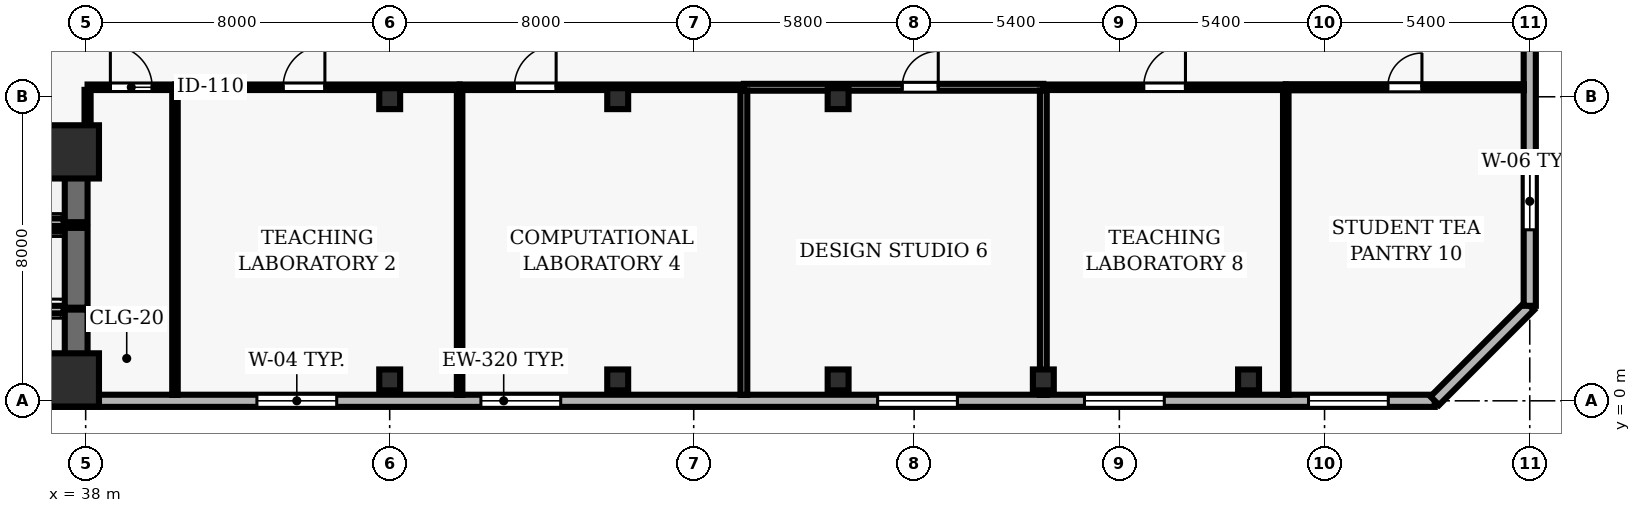
"""IFC4 building model, lengths in metres.
Left out: names, types, materials, properties, quantities, classifications, styles, units other than length and angle.
Written with IfcOpenShell. Run it as: python <this file> out.ifc"""

import sys

from ifc_helpers import new_model, si_unit, direction, frame, frame_2d, origin, origin_2d, place, context, subcontext, project, spatial, rectangle, hollow_rectangle, extrude, element, fill, save


model = new_model("IFC4")
c1 = context("Model", 3, precision=1e-05, world=origin(), true_north=direction((0.0, 1.0)))
c2 = subcontext(c1, "Body", "Model", "MODEL_VIEW")
j1 = project(units=[si_unit("LENGTHUNIT", "METRE"), si_unit("PLANEANGLEUNIT", "RADIAN")], contexts=[c1])
p1 = place(None, origin())
s1 = spatial("IfcSite", under=j1, at=p1, CompositionType="ELEMENT")
p2 = place(p1, origin())
s2 = spatial("IfcBuilding", under=s1, at=p2, CompositionType="ELEMENT")
p3 = place(p2, frame((0.0, 0.0, 66.1)))
s3 = spatial("IfcBuildingStorey", under=s2, at=p3, CompositionType="ELEMENT", Elevation=66.1)
for number, where, z_axis, x_axis in (
    (1, (37.65, 0.55, 0.0), (0.0, 0.0, 1.0), (1.0, 0.0, 0.0)),
    (2, (37.65, 6.55, 0.0), (0.0, 0.0, 1.0), (1.0, 0.0, 0.0)),
):
    element("IfcColumn", number, at=place(p3, frame(where, z_axis=z_axis, x_axis=x_axis)), inside=s3, PredefinedType="COLUMN", context=c2, shape_type="SweptSolid", body=[
        extrude(rectangle(XDim=1.4, YDim=1.4, at=origin_2d()), origin(), (0.0, 0.0, 1.0), 3.9),
    ])
for number, where, z_axis, x_axis in (
    (3, (46.0, 0.55, 0.0), (0.0, 0.0, 1.0), (1.0, 0.0, 0.0)),
    (4, (46.0, 7.95, 0.0), (0.0, 0.0, 1.0), (1.0, 0.0, 0.0)),
    (5, (52.0, 0.55, 0.0), (0.0, 0.0, 1.0), (1.0, 0.0, 0.0)),
    (6, (52.0, 7.95, 0.0), (0.0, 0.0, 1.0), (1.0, 0.0, 0.0)),
    (7, (57.8, 0.55, 0.0), (0.0, 0.0, 1.0), (1.0, 0.0, 0.0)),
    (8, (57.8, 7.95, 0.0), (0.0, 0.0, 1.0), (1.0, 0.0, 0.0)),
    (9, (63.2, 0.55, 0.0), (0.0, 0.0, 1.0), (1.0, 0.0, 0.0)),
    (10, (68.6, 0.55, 0.0), (0.0, 0.0, 1.0), (1.0, 0.0, 0.0)),
):
    element("IfcColumn", number, at=place(p3, frame(where, z_axis=z_axis, x_axis=x_axis)), inside=s3, PredefinedType="COLUMN", context=c2, shape_type="SweptSolid", body=[
        extrude(hollow_rectangle(XDim=0.55, YDim=0.55, WallThickness=0.025, at=origin_2d()), origin(), (0.0, 0.0, 1.0), 3.9),
    ])
p4 = place(p3, frame((24.5, 0.0, 0.0), z_axis=(0.0, 0.0, 1.0), x_axis=(1.0, 0.0, 0.0)))
e11 = element("IfcWall", 11, at=p4, inside=s3, PredefinedType="SOLIDWALL", context=c2, shape_type="SweptSolid", body=[
    extrude(rectangle(XDim=49.0, YDim=0.32, at=frame_2d((24.5, 0.0))), origin(), (0.0, 0.0, 1.0), 3.69),
])
p5 = place(p4, frame((1.672, 0.0, 0.9)))
e12 = element("IfcOpeningElement", 12, at=p5, cuts=e11, PredefinedType="OPENING", context=c2, shape_type="SweptSolid", body=[
    extrude(rectangle(XDim=2.1, YDim=1.6, at=frame_2d((1.05, 0.8))), frame((0.0, 0.17, 0.0), z_axis=(0.0, -1.0, 0.0), x_axis=(1.0, 0.0, 0.0)), (0.0, 0.0, 1.0), 0.34),
])
p6 = place(p4, frame((18.006, 0.0, 0.9)))
e13 = element("IfcOpeningElement", 13, at=p6, cuts=e11, PredefinedType="OPENING", context=c2, shape_type="SweptSolid", body=[
    extrude(rectangle(XDim=2.1, YDim=1.6, at=frame_2d((1.05, 0.8))), frame((0.0, 0.17, 0.0), z_axis=(0.0, -1.0, 0.0), x_axis=(1.0, 0.0, 0.0)), (0.0, 0.0, 1.0), 0.34),
])
p7 = place(p4, frame((23.9, 0.0, 0.9)))
e14 = element("IfcOpeningElement", 14, at=p7, cuts=e11, PredefinedType="OPENING", context=c2, shape_type="SweptSolid", body=[
    extrude(rectangle(XDim=2.1, YDim=1.6, at=frame_2d((1.05, 0.8))), frame((0.0, 0.17, 0.0), z_axis=(0.0, -1.0, 0.0), x_axis=(1.0, 0.0, 0.0)), (0.0, 0.0, 1.0), 0.34),
])
p8 = place(p4, frame((34.339, 0.0, 0.9)))
e15 = element("IfcOpeningElement", 15, at=p8, cuts=e11, PredefinedType="OPENING", context=c2, shape_type="SweptSolid", body=[
    extrude(rectangle(XDim=2.1, YDim=1.6, at=frame_2d((1.05, 0.8))), frame((0.0, 0.17, 0.0), z_axis=(0.0, -1.0, 0.0), x_axis=(1.0, 0.0, 0.0)), (0.0, 0.0, 1.0), 0.34),
])
p9 = place(p4, frame((39.783, 0.0, 0.9)))
e16 = element("IfcOpeningElement", 16, at=p9, cuts=e11, PredefinedType="OPENING", context=c2, shape_type="SweptSolid", body=[
    extrude(rectangle(XDim=2.1, YDim=1.6, at=frame_2d((1.05, 0.8))), frame((0.0, 0.17, 0.0), z_axis=(0.0, -1.0, 0.0), x_axis=(1.0, 0.0, 0.0)), (0.0, 0.0, 1.0), 0.34),
])
p10 = place(p4, frame((45.678, 0.0, 0.9)))
e17 = element("IfcOpeningElement", 17, at=p10, cuts=e11, PredefinedType="OPENING", context=c2, shape_type="SweptSolid", body=[
    extrude(rectangle(XDim=2.1, YDim=1.6, at=frame_2d((1.05, 0.8))), frame((0.0, 0.17, 0.0), z_axis=(0.0, -1.0, 0.0), x_axis=(1.0, 0.0, 0.0)), (0.0, 0.0, 1.0), 0.34),
])
p11 = place(p3, frame((73.5, 0.0, 0.0), z_axis=(0.0, 0.0, 1.0), x_axis=(0.707106781187, 0.707106781187, 0.0)))
e18 = element("IfcWall", 18, at=p11, inside=s3, PredefinedType="SOLIDWALL", context=c2, shape_type="SweptSolid", body=[
    extrude(rectangle(XDim=3.536, YDim=0.32, at=frame_2d((1.768, 0.0))), origin(), (0.0, 0.0, 1.0), 3.69),
])
p12 = place(p3, frame((76.0, 2.5, 0.0), z_axis=(0.0, 0.0, 1.0), x_axis=(0.0, 1.0, 0.0)))
e19 = element("IfcWall", 19, at=p12, inside=s3, PredefinedType="SOLIDWALL", context=c2, shape_type="SweptSolid", body=[
    extrude(rectangle(XDim=11.0, YDim=0.32, at=frame_2d((5.5, 0.0))), origin(), (0.0, 0.0, 1.0), 3.69),
])
p13 = place(p12, frame((2.0, 0.0, 0.9)))
e20 = element("IfcOpeningElement", 20, at=p13, cuts=e19, PredefinedType="OPENING", context=c2, shape_type="SweptSolid", body=[
    extrude(rectangle(XDim=1.5, YDim=1.8, at=frame_2d((0.75, 0.9))), frame((0.0, 0.17, 0.0), z_axis=(0.0, -1.0, 0.0), x_axis=(1.0, 0.0, 0.0)), (0.0, 0.0, 1.0), 0.34),
])
p14 = place(p12, frame((8.4, 0.0, 0.9)))
e21 = element("IfcOpeningElement", 21, at=p14, cuts=e19, PredefinedType="OPENING", context=c2, shape_type="SweptSolid", body=[
    extrude(rectangle(XDim=1.5, YDim=1.8, at=frame_2d((0.75, 0.9))), frame((0.0, 0.17, 0.0), z_axis=(0.0, -1.0, 0.0), x_axis=(1.0, 0.0, 0.0)), (0.0, 0.0, 1.0), 0.34),
])
p15 = place(p3, frame((37.75, 0.3, 0.0), z_axis=(0.0, 0.0, 1.0), x_axis=(0.0, 1.0, 0.0)))
e22 = element("IfcWall", 22, at=p15, inside=s3, PredefinedType="SHEAR", context=c2, shape_type="SweptSolid", body=[
    extrude(rectangle(XDim=2.1, YDim=0.6, at=frame_2d((1.05, 0.0))), origin(), (0.0, 0.0, 1.0), 3.69),
])
for number, where, z_axis, x_axis in (
    (23, (35.28, 0.3, 0.0), (0.0, 0.0, 1.0), (1.0, 0.0, 0.0)),
    (24, (37.42, 2.4, 0.0), (0.0, 0.0, 1.0), (-1.0, 0.0, 0.0)),
):
    element("IfcWall", number, at=place(p3, frame(where, z_axis=z_axis, x_axis=x_axis)), inside=s3, PredefinedType="SOLIDWALL", context=c2, shape_type="SweptSolid", body=[
        extrude(rectangle(XDim=2.14, YDim=0.2, at=frame_2d((1.07, 0.0))), origin(), (0.0, 0.0, 1.0), 3.69),
    ])
p16 = place(p3, frame((37.75, 2.45, 0.0), z_axis=(0.0, 0.0, 1.0), x_axis=(0.0, 1.0, 0.0)))
e25 = element("IfcWall", 25, at=p16, inside=s3, PredefinedType="SHEAR", context=c2, shape_type="SweptSolid", body=[
    extrude(rectangle(XDim=2.1, YDim=0.6, at=frame_2d((1.05, 0.0))), origin(), (0.0, 0.0, 1.0), 3.69),
])
p17 = place(p3, frame((37.42, 4.55, 0.0), z_axis=(0.0, 0.0, 1.0), x_axis=(-1.0, 0.0, 0.0)))
e26 = element("IfcWall", 26, at=p17, inside=s3, PredefinedType="SOLIDWALL", context=c2, shape_type="SweptSolid", body=[
    extrude(rectangle(XDim=2.14, YDim=0.2, at=frame_2d((1.07, 0.0))), origin(), (0.0, 0.0, 1.0), 3.69),
])
p18 = place(p3, frame((37.75, 4.7, 0.0), z_axis=(0.0, 0.0, 1.0), x_axis=(0.0, 1.0, 0.0)))
e27 = element("IfcWall", 27, at=p18, inside=s3, PredefinedType="SHEAR", context=c2, shape_type="SweptSolid", body=[
    extrude(rectangle(XDim=2.25, YDim=0.6, at=frame_2d((1.125, 0.0))), origin(), (0.0, 0.0, 1.0), 3.69),
])
for number, where, z_axis, x_axis in (
    (28, (35.28, 4.7, 0.0), (0.0, 0.0, 1.0), (1.0, 0.0, 0.0)),
    (29, (37.42, 6.95, 0.0), (0.0, 0.0, 1.0), (-1.0, 0.0, 0.0)),
):
    element("IfcWall", number, at=place(p3, frame(where, z_axis=z_axis, x_axis=x_axis)), inside=s3, PredefinedType="SOLIDWALL", context=c2, shape_type="SweptSolid", body=[
        extrude(rectangle(XDim=2.14, YDim=0.2, at=frame_2d((1.07, 0.0))), origin(), (0.0, 0.0, 1.0), 3.69),
    ])
p19 = place(p3, frame((38.05, 8.25, 0.0), z_axis=(0.0, 0.0, 1.0), x_axis=(1.0, 0.0, 0.0)))
e30 = element("IfcWall", 30, at=p19, inside=s3, PredefinedType="PARTITIONING", context=c2, shape_type="SweptSolid", body=[
    extrude(rectangle(XDim=2.3, YDim=0.145, at=frame_2d((1.15, 0.0))), origin(), (0.0, 0.0, 1.0), 3.055),
])
p20 = place(p19, frame((0.6, 0.0, 0.0)))
e31 = element("IfcOpeningElement", 31, at=p20, cuts=e30, PredefinedType="OPENING", context=c2, shape_type="SweptSolid", body=[
    extrude(rectangle(XDim=1.1, YDim=2.15, at=frame_2d((0.55, 1.075))), frame((0.0, 0.083, 0.0), z_axis=(0.0, -1.0, 0.0), x_axis=(1.0, 0.0, 0.0)), (0.0, 0.0, 1.0), 0.165),
])
p21 = place(p3, frame((40.35, 8.25, 0.0), z_axis=(0.0, 0.0, 1.0), x_axis=(1.0, 0.0, 0.0)))
e32 = element("IfcWall", 32, at=p21, inside=s3, PredefinedType="PARTITIONING", context=c2, shape_type="SweptSolid", body=[
    extrude(rectangle(XDim=7.49, YDim=0.145, at=frame_2d((3.745, 0.0))), origin(), (0.0, 0.0, 1.0), 3.055),
])
p22 = place(p21, frame((2.845, 0.0, 0.0)))
e33 = element("IfcOpeningElement", 33, at=p22, cuts=e32, PredefinedType="OPENING", context=c2, shape_type="SweptSolid", body=[
    extrude(rectangle(XDim=1.1, YDim=2.15, at=frame_2d((0.55, 1.075))), frame((0.0, 0.083, 0.0), z_axis=(0.0, -1.0, 0.0), x_axis=(1.0, 0.0, 0.0)), (0.0, 0.0, 1.0), 0.165),
])
p23 = place(p3, frame((47.84, 8.25, 0.0), z_axis=(0.0, 0.0, 1.0), x_axis=(1.0, 0.0, 0.0)))
e34 = element("IfcWall", 34, at=p23, inside=s3, PredefinedType="PARTITIONING", context=c2, shape_type="SweptSolid", body=[
    extrude(rectangle(XDim=7.48, YDim=0.145, at=frame_2d((3.74, 0.0))), origin(), (0.0, 0.0, 1.0), 3.055),
])
p24 = place(p23, frame((1.44, 0.0, 0.0)))
e35 = element("IfcOpeningElement", 35, at=p24, cuts=e34, PredefinedType="OPENING", context=c2, shape_type="SweptSolid", body=[
    extrude(rectangle(XDim=1.1, YDim=2.15, at=frame_2d((0.55, 1.075))), frame((0.0, 0.083, 0.0), z_axis=(0.0, -1.0, 0.0), x_axis=(1.0, 0.0, 0.0)), (0.0, 0.0, 1.0), 0.165),
])
p25 = place(p3, frame((55.32, 8.25, 0.0), z_axis=(0.0, 0.0, 1.0), x_axis=(1.0, 0.0, 0.0)))
e36 = element("IfcWall", 36, at=p25, inside=s3, PredefinedType="PARTITIONING", context=c2, shape_type="SweptSolid", body=[
    extrude(rectangle(XDim=7.88, YDim=0.18, at=frame_2d((3.94, 0.0))), origin(), (0.0, 0.0, 1.0), 3.055),
])
p26 = place(p25, frame((4.165, 0.0, 0.0)))
e37 = element("IfcOpeningElement", 37, at=p26, cuts=e36, PredefinedType="OPENING", context=c2, shape_type="SweptSolid", body=[
    extrude(rectangle(XDim=0.95, YDim=2.1, at=frame_2d((0.475, 1.05))), frame((0.0, 0.1, 0.0), z_axis=(0.0, -1.0, 0.0), x_axis=(1.0, 0.0, 0.0)), (0.0, 0.0, 1.0), 0.2),
])
p27 = place(p3, frame((63.2, 8.25, 0.0), z_axis=(0.0, 0.0, 1.0), x_axis=(1.0, 0.0, 0.0)))
e38 = element("IfcWall", 38, at=p27, inside=s3, PredefinedType="PARTITIONING", context=c2, shape_type="SweptSolid", body=[
    extrude(rectangle(XDim=6.38, YDim=0.145, at=frame_2d((3.19, 0.0))), origin(), (0.0, 0.0, 1.0), 3.69),
])
p28 = place(p27, frame((2.64, 0.0, 0.0)))
e39 = element("IfcOpeningElement", 39, at=p28, cuts=e38, PredefinedType="OPENING", context=c2, shape_type="SweptSolid", body=[
    extrude(rectangle(XDim=1.1, YDim=2.15, at=frame_2d((0.55, 1.075))), frame((0.0, 0.083, 0.0), z_axis=(0.0, -1.0, 0.0), x_axis=(1.0, 0.0, 0.0)), (0.0, 0.0, 1.0), 0.165),
])
p29 = place(p3, frame((69.58, 8.25, 0.0), z_axis=(0.0, 0.0, 1.0), x_axis=(1.0, 0.0, 0.0)))
e40 = element("IfcWall", 40, at=p29, inside=s3, PredefinedType="PARTITIONING", context=c2, shape_type="SweptSolid", body=[
    extrude(rectangle(XDim=6.265, YDim=0.16, at=frame_2d((3.132, 0.0))), origin(), (0.0, 0.0, 1.0), 3.69),
])
p30 = place(p29, frame((2.683, 0.0, 0.0)))
e41 = element("IfcOpeningElement", 41, at=p30, cuts=e40, PredefinedType="OPENING", context=c2, shape_type="SweptSolid", body=[
    extrude(rectangle(XDim=0.9, YDim=2.1, at=frame_2d((0.45, 1.05))), frame((0.0, 0.09, 0.0), z_axis=(0.0, -1.0, 0.0), x_axis=(1.0, 0.0, 0.0)), (0.0, 0.0, 1.0), 0.18),
])
p31 = place(p3, frame((38.05, 7.05, 0.0), z_axis=(0.0, 0.0, 1.0), x_axis=(0.0, 1.0, 0.0)))
e42 = element("IfcWall", 42, at=p31, inside=s3, PredefinedType="PARTITIONING", context=c2, shape_type="SweptSolid", body=[
    extrude(rectangle(XDim=1.132, YDim=0.16, at=frame_2d((0.566, 0.0))), origin(), (0.0, 0.0, 1.0), 3.055),
])
for number, where, z_axis, x_axis in (
    (43, (40.35, 0.155, 0.0), (0.0, 0.0, 1.0), (0.0, 1.0, 0.0)),
    (44, (47.84, 0.155, 0.0), (0.0, 0.0, 1.0), (0.0, 1.0, 0.0)),
):
    element("IfcWall", number, at=place(p3, frame(where, z_axis=z_axis, x_axis=x_axis)), inside=s3, PredefinedType="PARTITIONING", context=c2, shape_type="SweptSolid", body=[
        extrude(rectangle(XDim=8.027, YDim=0.145, at=frame_2d((4.013, 0.0))), origin(), (0.0, 0.0, 1.0), 3.69),
    ])
p32 = place(p3, frame((55.32, 0.155, 0.0), z_axis=(0.0, 0.0, 1.0), x_axis=(0.0, 1.0, 0.0)))
e45 = element("IfcWall", 45, at=p32, inside=s3, PredefinedType="PARTITIONING", context=c2, shape_type="SweptSolid", body=[
    extrude(rectangle(XDim=8.01, YDim=0.18, at=frame_2d((4.005, 0.0))), origin(), (0.0, 0.0, 1.0), 3.69),
])
p33 = place(p3, frame((63.2, 0.155, 0.0), z_axis=(0.0, 0.0, 1.0), x_axis=(0.0, 1.0, 0.0)))
e46 = element("IfcWall", 46, at=p33, inside=s3, PredefinedType="PARTITIONING", context=c2, shape_type="SweptSolid", body=[
    extrude(rectangle(XDim=8.01, YDim=0.18, at=frame_2d((4.005, 0.0))), origin(), (0.0, 0.0, 1.0), 3.055),
])
p34 = place(p3, frame((69.58, 0.155, 0.0), z_axis=(0.0, 0.0, 1.0), x_axis=(0.0, 1.0, 0.0)))
e47 = element("IfcWall", 47, at=p34, inside=s3, PredefinedType="PARTITIONING", context=c2, shape_type="SweptSolid", body=[
    extrude(rectangle(XDim=8.02, YDim=0.145, at=frame_2d((4.01, 0.0))), origin(), (0.0, 0.0, 1.0), 3.69),
])
p35 = place(p6, origin())
e48 = element("IfcWindow", 48, at=p35, inside=s3, PartitioningType="SINGLE_PANEL", PredefinedType="WINDOW", context=c2, shape_type="SweptSolid", body=[
    extrude(rectangle(XDim=2.1, YDim=1.6, at=frame_2d((1.05, 0.8))), frame((0.0, 0.03, 0.0), z_axis=(0.0, -1.0, 0.0), x_axis=(1.0, 0.0, 0.0)), (0.0, 0.0, 1.0), 0.06),
])
fill(e13, e48)
p36 = place(p7, origin())
e49 = element("IfcWindow", 49, at=p36, inside=s3, PartitioningType="SINGLE_PANEL", PredefinedType="WINDOW", context=c2, shape_type="SweptSolid", body=[
    extrude(rectangle(XDim=2.1, YDim=1.6, at=frame_2d((1.05, 0.8))), frame((0.0, 0.03, 0.0), z_axis=(0.0, -1.0, 0.0), x_axis=(1.0, 0.0, 0.0)), (0.0, 0.0, 1.0), 0.06),
])
fill(e14, e49)
p37 = place(p8, origin())
e50 = element("IfcWindow", 50, at=p37, inside=s3, PartitioningType="SINGLE_PANEL", PredefinedType="WINDOW", context=c2, shape_type="SweptSolid", body=[
    extrude(rectangle(XDim=2.1, YDim=1.6, at=frame_2d((1.05, 0.8))), frame((0.0, 0.03, 0.0), z_axis=(0.0, -1.0, 0.0), x_axis=(1.0, 0.0, 0.0)), (0.0, 0.0, 1.0), 0.06),
])
fill(e15, e50)
p38 = place(p9, origin())
e51 = element("IfcWindow", 51, at=p38, inside=s3, PartitioningType="SINGLE_PANEL", PredefinedType="WINDOW", context=c2, shape_type="SweptSolid", body=[
    extrude(rectangle(XDim=2.1, YDim=1.6, at=frame_2d((1.05, 0.8))), frame((0.0, 0.03, 0.0), z_axis=(0.0, -1.0, 0.0), x_axis=(1.0, 0.0, 0.0)), (0.0, 0.0, 1.0), 0.06),
])
fill(e16, e51)
p39 = place(p10, origin())
e52 = element("IfcWindow", 52, at=p39, inside=s3, PartitioningType="SINGLE_PANEL", PredefinedType="WINDOW", context=c2, shape_type="SweptSolid", body=[
    extrude(rectangle(XDim=2.1, YDim=1.6, at=frame_2d((1.05, 0.8))), frame((0.0, 0.03, 0.0), z_axis=(0.0, -1.0, 0.0), x_axis=(1.0, 0.0, 0.0)), (0.0, 0.0, 1.0), 0.06),
])
fill(e17, e52)
p40 = place(p13, origin())
e53 = element("IfcWindow", 53, at=p40, inside=s3, PartitioningType="SINGLE_PANEL", PredefinedType="WINDOW", context=c2, shape_type="SweptSolid", body=[
    extrude(rectangle(XDim=1.5, YDim=1.8, at=frame_2d((0.75, 0.9))), frame((0.0, 0.03, 0.0), z_axis=(0.0, -1.0, 0.0), x_axis=(1.0, 0.0, 0.0)), (0.0, 0.0, 1.0), 0.06),
])
fill(e20, e53)
p41 = place(p20, origin())
e54 = element("IfcDoor", 54, at=p41, inside=s3, OperationType="SINGLE_SWING_LEFT", PredefinedType="DOOR", context=c2, shape_type="SweptSolid", body=[
    extrude(rectangle(XDim=1.1, YDim=2.15, at=frame_2d((0.55, 1.075))), frame((0.0, 0.025, 0.0), z_axis=(0.0, -1.0, 0.0), x_axis=(1.0, 0.0, 0.0)), (0.0, 0.0, 1.0), 0.05),
])
fill(e31, e54)
p42 = place(p22, origin())
e55 = element("IfcDoor", 55, at=p42, inside=s3, OperationType="SINGLE_SWING_RIGHT", PredefinedType="DOOR", context=c2, shape_type="SweptSolid", body=[
    extrude(rectangle(XDim=1.1, YDim=2.15, at=frame_2d((0.55, 1.075))), frame((0.0, 0.025, 0.0), z_axis=(0.0, -1.0, 0.0), x_axis=(1.0, 0.0, 0.0)), (0.0, 0.0, 1.0), 0.05),
])
fill(e33, e55)
p43 = place(p24, origin())
e56 = element("IfcDoor", 56, at=p43, inside=s3, OperationType="SINGLE_SWING_RIGHT", PredefinedType="DOOR", context=c2, shape_type="SweptSolid", body=[
    extrude(rectangle(XDim=1.1, YDim=2.15, at=frame_2d((0.55, 1.075))), frame((0.0, 0.025, 0.0), z_axis=(0.0, -1.0, 0.0), x_axis=(1.0, 0.0, 0.0)), (0.0, 0.0, 1.0), 0.05),
])
fill(e35, e56)
p44 = place(p26, origin())
e57 = element("IfcDoor", 57, at=p44, inside=s3, OperationType="SINGLE_SWING_RIGHT", PredefinedType="DOOR", context=c2, shape_type="SweptSolid", body=[
    extrude(rectangle(XDim=0.95, YDim=2.1, at=frame_2d((0.475, 1.05))), frame((0.0, 0.025, 0.0), z_axis=(0.0, -1.0, 0.0), x_axis=(1.0, 0.0, 0.0)), (0.0, 0.0, 1.0), 0.05),
])
fill(e37, e57)
p45 = place(p28, origin())
e58 = element("IfcDoor", 58, at=p45, inside=s3, OperationType="SINGLE_SWING_RIGHT", PredefinedType="DOOR", context=c2, shape_type="SweptSolid", body=[
    extrude(rectangle(XDim=1.1, YDim=2.15, at=frame_2d((0.55, 1.075))), frame((0.0, 0.025, 0.0), z_axis=(0.0, -1.0, 0.0), x_axis=(1.0, 0.0, 0.0)), (0.0, 0.0, 1.0), 0.05),
])
fill(e39, e58)
p46 = place(p30, origin())
e59 = element("IfcDoor", 59, at=p46, inside=s3, OperationType="SINGLE_SWING_RIGHT", PredefinedType="DOOR", context=c2, shape_type="SweptSolid", body=[
    extrude(rectangle(XDim=0.9, YDim=2.1, at=frame_2d((0.45, 1.05))), frame((0.0, 0.025, 0.0), z_axis=(0.0, -1.0, 0.0), x_axis=(1.0, 0.0, 0.0)), (0.0, 0.0, 1.0), 0.05),
])
fill(e41, e59)
save(model, sys.argv[1])
